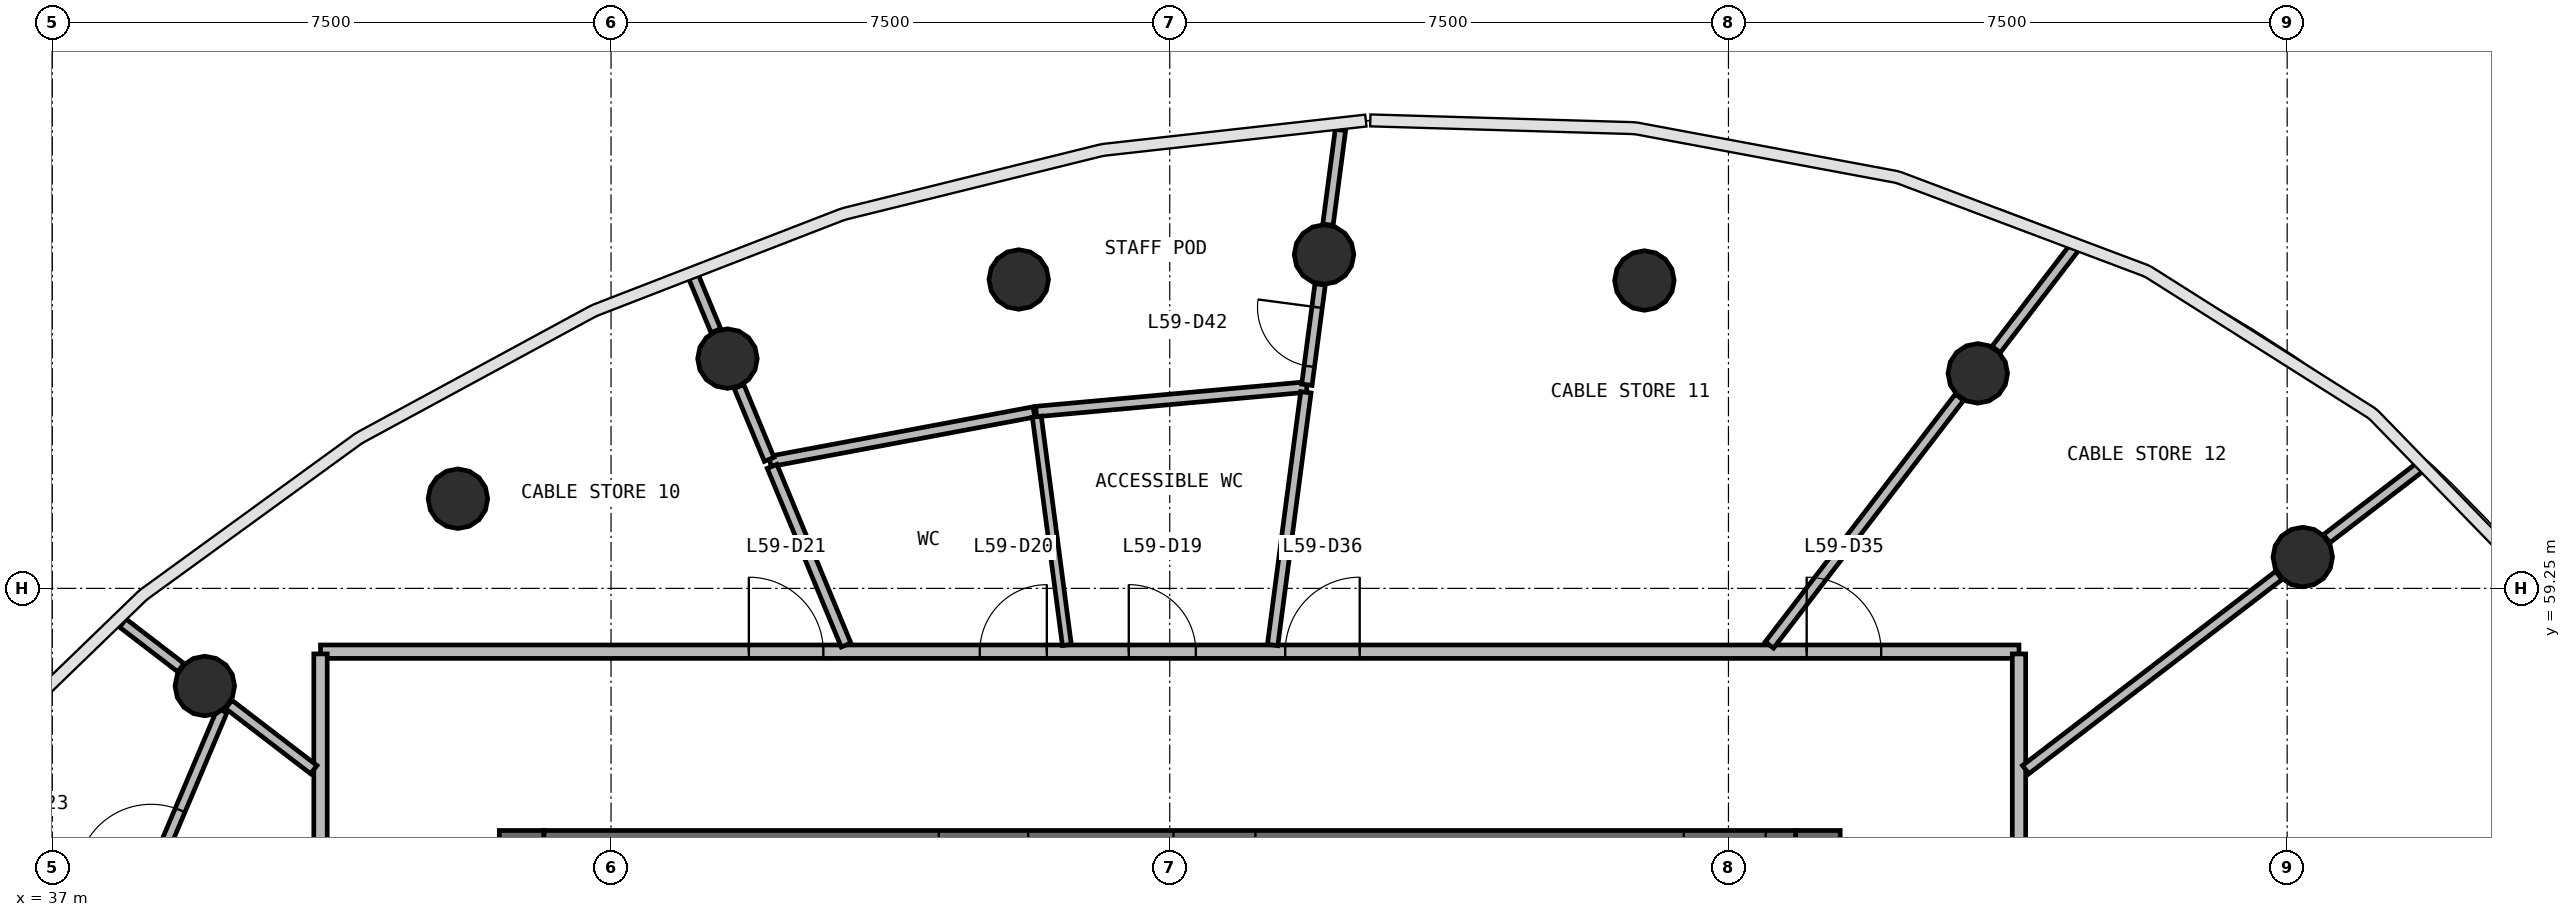
"""IFC4 building model, lengths in metres.
Left out: names, types, materials, properties, quantities, classifications, styles, units other than length and angle.
Written with IfcOpenShell. Run it as: python <this file> out.ifc"""

import sys

from ifc_helpers import new_model, si_unit, direction, frame, frame_2d, origin, origin_2d, place, context, subcontext, project, spatial, rectangle, circle, extrude, source, transform, mapped, element, fill, save


model = new_model("IFC4")
c1 = context("Model", 3, precision=1e-05, world=origin(), true_north=direction((0.0, 1.0)))
c2 = subcontext(c1, "Body", "Model", "MODEL_VIEW")
j1 = project(units=[si_unit("LENGTHUNIT", "METRE"), si_unit("PLANEANGLEUNIT", "RADIAN")], contexts=[c1])
p1 = place(None, origin())
s1 = spatial("IfcSite", under=j1, at=p1, CompositionType="ELEMENT")
p2 = place(p1, origin())
s2 = spatial("IfcBuilding", under=s1, at=p2, CompositionType="ELEMENT")
p3 = place(p2, frame((0.0, 0.0, 242.3)))
s3 = spatial("IfcBuildingStorey", under=s2, at=p3, CompositionType="ELEMENT", Elevation=242.3)
p4 = place(p3, frame((60.7, 40.0, 0.0), z_axis=(0.0, 0.0, 1.0), x_axis=(0.0, 1.0, 0.0)))
e1 = element("IfcWall", 1, at=p4, inside=s3, PredefinedType="SHEAR", context=c2, shape_type="SweptSolid", body=[
    extrude(rectangle(XDim=16.0, YDim=0.6, at=frame_2d((8.0, 0.0))), origin(), (0.0, 0.0, 1.0), 3.9),
])
p5 = place(p4, frame((7.1, 0.0, 0.0)))
e2 = element("IfcOpeningElement", 2, at=p5, cuts=e1, PredefinedType="OPENING", context=c2, shape_type="SweptSolid", body=[
    extrude(rectangle(XDim=1.8, YDim=2.1, at=frame_2d((0.9, 1.05))), frame((0.0, 0.31, 0.0), z_axis=(0.0, -1.0, 0.0), x_axis=(1.0, 0.0, 0.0)), (0.0, 0.0, 1.0), 0.62),
])
p6 = place(p3, frame((43.3, 56.0, 0.0), z_axis=(0.0, 0.0, 1.0), x_axis=(0.0, -1.0, 0.0)))
e3 = element("IfcWall", 3, at=p6, inside=s3, PredefinedType="SHEAR", context=c2, shape_type="SweptSolid", body=[
    extrude(rectangle(XDim=16.0, YDim=0.6, at=frame_2d((8.0, 0.0))), origin(), (0.0, 0.0, 1.0), 3.9),
])
p7 = place(p6, frame((7.1, 0.0, 0.0)))
e4 = element("IfcOpeningElement", 4, at=p7, cuts=e3, PredefinedType="OPENING", context=c2, shape_type="SweptSolid", body=[
    extrude(rectangle(XDim=1.8, YDim=2.1, at=frame_2d((0.9, 1.05))), frame((0.0, 0.31, 0.0), z_axis=(0.0, -1.0, 0.0), x_axis=(1.0, 0.0, 0.0)), (0.0, 0.0, 1.0), 0.62),
])
p8 = place(p3, frame((60.4, 55.7, 0.0), z_axis=(0.0, 0.0, 1.0), x_axis=(-1.0, 0.0, 0.0)))
e5 = element("IfcWall", 5, at=p8, inside=s3, PredefinedType="SHEAR", context=c2, shape_type="SweptSolid", body=[
    extrude(rectangle(XDim=16.8, YDim=0.6, at=frame_2d((8.4, 0.0))), origin(), (0.0, 0.0, 1.0), 3.9),
])
p9 = place(p8, frame((0.4, 0.0, 0.0)))
e6 = element("IfcOpeningElement", 6, at=p9, cuts=e5, PredefinedType="OPENING", context=c2, shape_type="SweptSolid", body=[
    extrude(rectangle(XDim=1.1, YDim=2.1, at=frame_2d((0.55, 1.05))), frame((0.0, 0.31, 0.0), z_axis=(0.0, -1.0, 0.0), x_axis=(1.0, 0.0, 0.0)), (0.0, 0.0, 1.0), 0.62),
])
p10 = place(p8, frame((10.3, 0.0, 0.0)))
e7 = element("IfcOpeningElement", 7, at=p10, cuts=e5, PredefinedType="OPENING", context=c2, shape_type="SweptSolid", body=[
    extrude(rectangle(XDim=1.2, YDim=2.1, at=frame_2d((0.6, 1.05))), frame((0.0, 0.31, 0.0), z_axis=(0.0, -1.0, 0.0), x_axis=(1.0, 0.0, 0.0)), (0.0, 0.0, 1.0), 0.62),
])
p11 = place(p8, frame((7.25, 0.0, 0.0)))
e8 = element("IfcOpeningElement", 8, at=p11, cuts=e5, PredefinedType="OPENING", context=c2, shape_type="SweptSolid", body=[
    extrude(rectangle(XDim=1.1, YDim=2.1, at=frame_2d((0.55, 1.05))), frame((0.0, 0.31, 0.0), z_axis=(0.0, -1.0, 0.0), x_axis=(1.0, 0.0, 0.0)), (0.0, 0.0, 1.0), 0.62),
])
m1 = source(origin(), c2, "Body", "SweptSolid", [
    extrude(circle(Radius=0.4, at=origin_2d()), origin(), (0.0, 0.0, 1.0), 3.9),
])
for number, where, z_axis, x_axis in (
    (9, (67.209, 59.671, 0.0), (0.0, 0.0, 1.0), (1.0, 0.0, 0.0)),
    (10, (62.847, 62.136, 0.0), (0.0, 0.0, 1.0), (1.0, 0.0, 0.0)),
    (11, (58.372, 63.383, 0.0), (0.0, 0.0, 1.0), (1.0, 0.0, 0.0)),
    (12, (54.071, 63.731, 0.0), (0.0, 0.0, 1.0), (1.0, 0.0, 0.0)),
    (13, (49.973, 63.396, 0.0), (0.0, 0.0, 1.0), (1.0, 0.0, 0.0)),
    (14, (46.063, 62.334, 0.0), (0.0, 0.0, 1.0), (1.0, 0.0, 0.0)),
    (15, (42.444, 60.453, 0.0), (0.0, 0.0, 1.0), (1.0, 0.0, 0.0)),
    (16, (39.047, 57.939, 0.0), (0.0, 0.0, 1.0), (1.0, 0.0, 0.0)),
):
    element("IfcColumn", number, at=place(p3, frame(where, z_axis=z_axis, x_axis=x_axis)), inside=s3, PredefinedType="COLUMN", context=c2, shape_type="MappedRepresentation", body=[
        mapped(m1, transform((0.0, 0.0, 0.0), scale=1.0)),
    ])
p12 = place(p3, frame((40.6, 58.4, 0.0), z_axis=(0.0, 0.0, 1.0), x_axis=(1.0, 0.0, 0.0)))
e17 = element("IfcWall", 17, at=p12, inside=s3, PredefinedType="PARTITIONING", context=c2, shape_type="SweptSolid", body=[
    extrude(rectangle(XDim=22.8, YDim=0.18, at=frame_2d((11.4, 0.0))), origin(), (0.0, 0.0, 1.0), 2.88),
])
p13 = place(p12, frame((10.85, 0.0, 0.0)))
e18 = element("IfcOpeningElement", 18, at=p13, cuts=e17, PredefinedType="OPENING", context=c2, shape_type="SweptSolid", body=[
    extrude(rectangle(XDim=0.9, YDim=2.1, at=frame_2d((0.45, 1.05))), frame((0.0, 0.1, 0.0), z_axis=(0.0, -1.0, 0.0), x_axis=(1.0, 0.0, 0.0)), (0.0, 0.0, 1.0), 0.2),
])
p14 = place(p12, frame((8.85, 0.0, 0.0)))
e19 = element("IfcOpeningElement", 19, at=p14, cuts=e17, PredefinedType="OPENING", context=c2, shape_type="SweptSolid", body=[
    extrude(rectangle(XDim=0.9, YDim=2.1, at=frame_2d((0.45, 1.05))), frame((0.0, 0.1, 0.0), z_axis=(0.0, -1.0, 0.0), x_axis=(1.0, 0.0, 0.0)), (0.0, 0.0, 1.0), 0.2),
])
p15 = place(p12, frame((5.75, 0.0, 0.0)))
e20 = element("IfcOpeningElement", 20, at=p15, cuts=e17, PredefinedType="OPENING", context=c2, shape_type="SweptSolid", body=[
    extrude(rectangle(XDim=1.0, YDim=2.1, at=frame_2d((0.5, 1.05))), frame((0.0, 0.1, 0.0), z_axis=(0.0, -1.0, 0.0), x_axis=(1.0, 0.0, 0.0)), (0.0, 0.0, 1.0), 0.2),
])
p16 = place(p12, frame((19.95, 0.0, 0.0)))
e21 = element("IfcOpeningElement", 21, at=p16, cuts=e17, PredefinedType="OPENING", context=c2, shape_type="SweptSolid", body=[
    extrude(rectangle(XDim=1.0, YDim=2.1, at=frame_2d((0.5, 1.05))), frame((0.0, 0.1, 0.0), z_axis=(0.0, -1.0, 0.0), x_axis=(1.0, 0.0, 0.0)), (0.0, 0.0, 1.0), 0.2),
])
p17 = place(p12, frame((12.95, 0.0, 0.0)))
e22 = element("IfcOpeningElement", 22, at=p17, cuts=e17, PredefinedType="OPENING", context=c2, shape_type="SweptSolid", body=[
    extrude(rectangle(XDim=1.0, YDim=2.1, at=frame_2d((0.5, 1.05))), frame((0.0, 0.1, 0.0), z_axis=(0.0, -1.0, 0.0), x_axis=(1.0, 0.0, 0.0)), (0.0, 0.0, 1.0), 0.2),
])
p18 = place(p3, frame((63.4, 58.37, 0.0), z_axis=(0.0, 0.0, 1.0), x_axis=(0.0, -1.0, 0.0)))
e23 = element("IfcWall", 23, at=p18, inside=s3, PredefinedType="PARTITIONING", context=c2, shape_type="SweptSolid", body=[
    extrude(rectangle(XDim=20.74, YDim=0.18, at=frame_2d((10.37, 0.0))), origin(), (0.0, 0.0, 1.0), 2.88),
])
p19 = place(p18, frame((9.89, 0.0, 0.0)))
e24 = element("IfcOpeningElement", 24, at=p19, cuts=e23, PredefinedType="OPENING", context=c2, shape_type="SweptSolid", body=[
    extrude(rectangle(XDim=1.0, YDim=2.1, at=frame_2d((0.5, 1.05))), frame((0.0, 0.1, 0.0), z_axis=(0.0, -1.0, 0.0), x_axis=(1.0, 0.0, 0.0)), (0.0, 0.0, 1.0), 0.2),
])
p20 = place(p18, frame((7.69, 0.0, 0.0)))
e25 = element("IfcOpeningElement", 25, at=p20, cuts=e23, PredefinedType="OPENING", context=c2, shape_type="SweptSolid", body=[
    extrude(rectangle(XDim=1.0, YDim=2.1, at=frame_2d((0.5, 1.05))), frame((0.0, 0.1, 0.0), z_axis=(0.0, -1.0, 0.0), x_axis=(1.0, 0.0, 0.0)), (0.0, 0.0, 1.0), 0.2),
])
p21 = place(p3, frame((40.6, 37.63, 0.0), z_axis=(0.0, 0.0, 1.0), x_axis=(0.0, 1.0, 0.0)))
e26 = element("IfcWall", 26, at=p21, inside=s3, PredefinedType="PARTITIONING", context=c2, shape_type="SweptSolid", body=[
    extrude(rectangle(XDim=20.74, YDim=0.18, at=frame_2d((10.37, 0.0))), origin(), (0.0, 0.0, 1.0), 2.88),
])
p22 = place(p21, frame((9.89, 0.0, 0.0)))
e27 = element("IfcOpeningElement", 27, at=p22, cuts=e26, PredefinedType="OPENING", context=c2, shape_type="SweptSolid", body=[
    extrude(rectangle(XDim=1.0, YDim=2.1, at=frame_2d((0.5, 1.05))), frame((0.0, 0.1, 0.0), z_axis=(0.0, -1.0, 0.0), x_axis=(1.0, 0.0, 0.0)), (0.0, 0.0, 1.0), 0.2),
])
p23 = place(p21, frame((7.69, 0.0, 0.0)))
e28 = element("IfcOpeningElement", 28, at=p23, cuts=e26, PredefinedType="OPENING", context=c2, shape_type="SweptSolid", body=[
    extrude(rectangle(XDim=1.0, YDim=2.1, at=frame_2d((0.5, 1.05))), frame((0.0, 0.1, 0.0), z_axis=(0.0, -1.0, 0.0), x_axis=(1.0, 0.0, 0.0)), (0.0, 0.0, 1.0), 0.2),
])
p24 = place(p3, frame((63.49, 56.817, 0.0), z_axis=(0.0, 0.0, 1.0), x_axis=(0.793358616255, 0.608754553177, 0.0)))
e29 = element("IfcWall", 29, at=p24, inside=s3, PredefinedType="PARTITIONING", context=c2, shape_type="SweptSolid", body=[
    extrude(rectangle(XDim=4.284, YDim=0.14, at=frame_2d((2.142, 0.0))), origin(), (0.0, 0.0, 1.0), 2.88),
])
p25 = place(p3, frame((60.049, 58.49, 0.0), z_axis=(0.0, 0.0, 1.0), x_axis=(0.60875313342, 0.793359705651, 0.0)))
e30 = element("IfcWall", 30, at=p25, inside=s3, PredefinedType="PARTITIONING", context=c2, shape_type="SweptSolid", body=[
    extrude(rectangle(XDim=4.191, YDim=0.14, at=frame_2d((2.095, 0.0))), origin(), (0.0, 0.0, 1.0), 2.88),
])
p26 = place(p3, frame((37.731, 53.943, 0.0), z_axis=(0.0, 0.0, 1.0), x_axis=(0.389219643962, 0.921144977055, 0.0)))
e31 = element("IfcWall", 31, at=p26, inside=s3, PredefinedType="PARTITIONING", context=c2, shape_type="SweptSolid", body=[
    extrude(rectangle(XDim=3.979, YDim=0.14, at=frame_2d((1.99, 0.0))), origin(), (0.0, 0.0, 1.0), 2.88),
])
p27 = place(p26, frame((1.53, 0.0, 0.0)))
e32 = element("IfcOpeningElement", 32, at=p27, cuts=e31, PredefinedType="OPENING", context=c2, shape_type="SweptSolid", body=[
    extrude(rectangle(XDim=1.0, YDim=2.1, at=frame_2d((0.5, 1.05))), frame((0.0, 0.08, 0.0), z_axis=(0.0, -1.0, 0.0), x_axis=(1.0, 0.0, 0.0)), (0.0, 0.0, 1.0), 0.16),
])
p28 = place(p3, frame((53.837, 61.953, 0.0), z_axis=(0.0, 0.0, 1.0), x_axis=(-0.995916776941, -0.090276095442, 0.0)))
e33 = element("IfcWall", 33, at=p28, inside=s3, PredefinedType="PARTITIONING", context=c2, shape_type="SweptSolid", body=[
    extrude(rectangle(XDim=3.646, YDim=0.14, at=frame_2d((1.823, 0.0))), origin(), (0.0, 0.0, 1.0), 2.88),
])
p29 = place(p3, frame((50.177, 61.618, 0.0), z_axis=(0.0, 0.0, 1.0), x_axis=(-0.9828698865, -0.184300803609, 0.0)))
e34 = element("IfcWall", 34, at=p29, inside=s3, PredefinedType="PARTITIONING", context=c2, shape_type="SweptSolid", body=[
    extrude(rectangle(XDim=3.604, YDim=0.14, at=frame_2d((1.802, 0.0))), origin(), (0.0, 0.0, 1.0), 2.88),
])
p30 = place(p3, frame((53.381, 58.49, 0.0), z_axis=(0.0, 0.0, 1.0), x_axis=(0.130522814707, 0.991445306026, 0.0)))
e35 = element("IfcWall", 35, at=p30, inside=s3, PredefinedType="PARTITIONING", context=c2, shape_type="SweptSolid", body=[
    extrude(rectangle(XDim=3.421, YDim=0.14, at=frame_2d((1.71, 0.0))), origin(), (0.0, 0.0, 1.0), 2.88),
])
p31 = place(p3, frame((47.655, 58.49, 0.0), z_axis=(0.0, 0.0, 1.0), x_axis=(-0.382617614875, 0.923906792262, 0.0)))
e36 = element("IfcWall", 36, at=p31, inside=s3, PredefinedType="PARTITIONING", context=c2, shape_type="SweptSolid", body=[
    extrude(rectangle(XDim=2.596, YDim=0.14, at=frame_2d((1.298, 0.0))), origin(), (0.0, 0.0, 1.0), 2.88),
])
p32 = place(p3, frame((63.093, 62.457, 0.0), z_axis=(0.0, 0.0, 1.0), x_axis=(0.608647541693, 0.793440716116, 0.0)))
e37 = element("IfcWall", 37, at=p32, inside=s3, PredefinedType="PARTITIONING", context=c2, shape_type="SweptSolid", body=[
    extrude(rectangle(XDim=1.732, YDim=0.14, at=frame_2d((0.866, 0.0))), origin(), (0.0, 0.0, 1.0), 2.88),
])
p33 = place(p3, frame((67.531, 59.917, 0.0), z_axis=(0.0, 0.0, 1.0), x_axis=(0.793355628453, 0.608758447006, 0.0)))
e38 = element("IfcWall", 38, at=p33, inside=s3, PredefinedType="PARTITIONING", context=c2, shape_type="SweptSolid", body=[
    extrude(rectangle(XDim=1.599, YDim=0.14, at=frame_2d((0.799, 0.0))), origin(), (0.0, 0.0, 1.0), 2.88),
])
p34 = place(p3, frame((40.51, 56.817, 0.0), z_axis=(0.0, 0.0, 1.0), x_axis=(-0.793316945216, 0.608808857059, 0.0)))
e39 = element("IfcWall", 39, at=p34, inside=s3, PredefinedType="PARTITIONING", context=c2, shape_type="SweptSolid", body=[
    extrude(rectangle(XDim=1.44, YDim=0.14, at=frame_2d((0.72, 0.0))), origin(), (0.0, 0.0, 1.0), 2.88),
])
p35 = place(p3, frame((53.841, 61.983, 0.0), z_axis=(0.0, 0.0, 1.0), x_axis=(0.130598565914, 0.991435330509, 0.0)))
e40 = element("IfcWall", 40, at=p35, inside=s3, PredefinedType="PARTITIONING", context=c2, shape_type="SweptSolid", body=[
    extrude(rectangle(XDim=1.359, YDim=0.14, at=frame_2d((0.68, 0.0))), origin(), (0.0, 0.0, 1.0), 2.88),
])
p36 = place(p35, frame((0.25, 0.0, 0.0)))
e41 = element("IfcOpeningElement", 41, at=p36, cuts=e40, PredefinedType="OPENING", context=c2, shape_type="SweptSolid", body=[
    extrude(rectangle(XDim=0.8, YDim=2.1, at=frame_2d((0.4, 1.05))), frame((0.0, 0.08, 0.0), z_axis=(0.0, -1.0, 0.0), x_axis=(1.0, 0.0, 0.0)), (0.0, 0.0, 1.0), 0.16),
])
p37 = place(p3, frame((54.124, 64.132, 0.0), z_axis=(0.0, 0.0, 1.0), x_axis=(0.130617047537, 0.991432895809, 0.0)))
e42 = element("IfcWall", 42, at=p37, inside=s3, PredefinedType="PARTITIONING", context=c2, shape_type="SweptSolid", body=[
    extrude(rectangle(XDim=1.282, YDim=0.14, at=frame_2d((0.641, 0.0))), origin(), (0.0, 0.0, 1.0), 2.88),
])
p38 = place(p3, frame((46.623, 60.982, 0.0), z_axis=(0.0, 0.0, 1.0), x_axis=(-0.382698137168, 0.923873441445, 0.0)))
e43 = element("IfcWall", 43, at=p38, inside=s3, PredefinedType="PARTITIONING", context=c2, shape_type="SweptSolid", body=[
    extrude(rectangle(XDim=1.058, YDim=0.14, at=frame_2d((0.529, 0.0))), origin(), (0.0, 0.0, 1.0), 2.88),
])
p39 = place(p3, frame((38.726, 58.186, 0.0), z_axis=(0.0, 0.0, 1.0), x_axis=(-0.793454398597, 0.608629704622, 0.0)))
e44 = element("IfcWall", 44, at=p39, inside=s3, PredefinedType="PARTITIONING", context=c2, shape_type="SweptSolid", body=[
    extrude(rectangle(XDim=0.983, YDim=0.14, at=frame_2d((0.491, 0.0))), origin(), (0.0, 0.0, 1.0), 2.88),
])
p40 = place(p3, frame((45.908, 62.708, 0.0), z_axis=(0.0, 0.0, 1.0), x_axis=(-0.382763038267, 0.923846554649, 0.0)))
e45 = element("IfcWall", 45, at=p40, inside=s3, PredefinedType="PARTITIONING", context=c2, shape_type="SweptSolid", body=[
    extrude(rectangle(XDim=0.786, YDim=0.14, at=frame_2d((0.393, 0.0))), origin(), (0.0, 0.0, 1.0), 2.88),
])
p41 = place(p3, frame((50.619, 58.49, 0.0), z_axis=(0.0, 0.0, 1.0), x_axis=(-0.130487204363, 0.991449993443, 0.0)))
e46 = element("IfcWall", 46, at=p41, inside=s3, PredefinedType="PARTITIONING", context=c2, shape_type="SweptSolid", body=[
    extrude(rectangle(XDim=3.091, YDim=0.12, at=frame_2d((1.545, 0.0))), origin(), (0.0, 0.0, 1.0), 2.88),
])
m2 = source(origin(), c2, "Body", "SweptSolid", [
    extrude(rectangle(XDim=0.9, YDim=2.1, at=frame_2d((0.45, 1.05))), frame((0.0, 0.025, 0.0), z_axis=(0.0, -1.0, 0.0), x_axis=(1.0, 0.0, 0.0)), (0.0, 0.0, 1.0), 0.05),
])
p42 = place(p13, origin())
e47 = element("IfcDoor", 47, at=p42, inside=s3, OperationType="SINGLE_SWING_LEFT", PredefinedType="DOOR", context=c2, shape_type="MappedRepresentation", body=[
    mapped(m2, transform((0.0, 0.0, 0.0), scale=1.0)),
])
fill(e18, e47)
p43 = place(p14, origin())
e48 = element("IfcDoor", 48, at=p43, inside=s3, OperationType="SINGLE_SWING_RIGHT", PredefinedType="DOOR", context=c2, shape_type="MappedRepresentation", body=[
    mapped(m2, transform((0.0, 0.0, 0.0), scale=1.0)),
])
fill(e19, e48)
m3 = source(origin(), c2, "Body", "SweptSolid", [
    extrude(rectangle(XDim=1.0, YDim=2.1, at=frame_2d((0.5, 1.05))), frame((0.0, 0.025, 0.0), z_axis=(0.0, -1.0, 0.0), x_axis=(1.0, 0.0, 0.0)), (0.0, 0.0, 1.0), 0.05),
])
p44 = place(p15, origin())
e49 = element("IfcDoor", 49, at=p44, inside=s3, OperationType="SINGLE_SWING_LEFT", PredefinedType="DOOR", context=c2, shape_type="MappedRepresentation", body=[
    mapped(m3, transform((0.0, 0.0, 0.0), scale=1.0)),
])
fill(e20, e49)
p45 = place(p27, origin())
e50 = element("IfcDoor", 50, at=p45, inside=s3, OperationType="SINGLE_SWING_LEFT", PredefinedType="DOOR", context=c2, shape_type="MappedRepresentation", body=[
    mapped(m3, transform((0.0, 0.0, 0.0), scale=1.0)),
])
fill(e32, e50)
p46 = place(p16, origin())
e51 = element("IfcDoor", 51, at=p46, inside=s3, OperationType="SINGLE_SWING_LEFT", PredefinedType="DOOR", context=c2, shape_type="MappedRepresentation", body=[
    mapped(m3, transform((0.0, 0.0, 0.0), scale=1.0)),
])
fill(e21, e51)
p47 = place(p17, origin())
e52 = element("IfcDoor", 52, at=p47, inside=s3, OperationType="SINGLE_SWING_RIGHT", PredefinedType="DOOR", context=c2, shape_type="MappedRepresentation", body=[
    mapped(m3, transform((0.0, 0.0, 0.0), scale=1.0)),
])
fill(e22, e52)
m4 = source(origin(), c2, "Body", "SweptSolid", [
    extrude(rectangle(XDim=0.8, YDim=2.1, at=frame_2d((0.4, 1.05))), frame((0.0, 0.025, 0.0), z_axis=(0.0, -1.0, 0.0), x_axis=(1.0, 0.0, 0.0)), (0.0, 0.0, 1.0), 0.05),
])
p48 = place(p36, origin())
e53 = element("IfcDoor", 53, at=p48, inside=s3, OperationType="SINGLE_SWING_RIGHT", PredefinedType="DOOR", context=c2, shape_type="MappedRepresentation", body=[
    mapped(m4, transform((0.0, 0.0, 0.0), scale=1.0)),
])
fill(e41, e53)
save(model, sys.argv[1])
